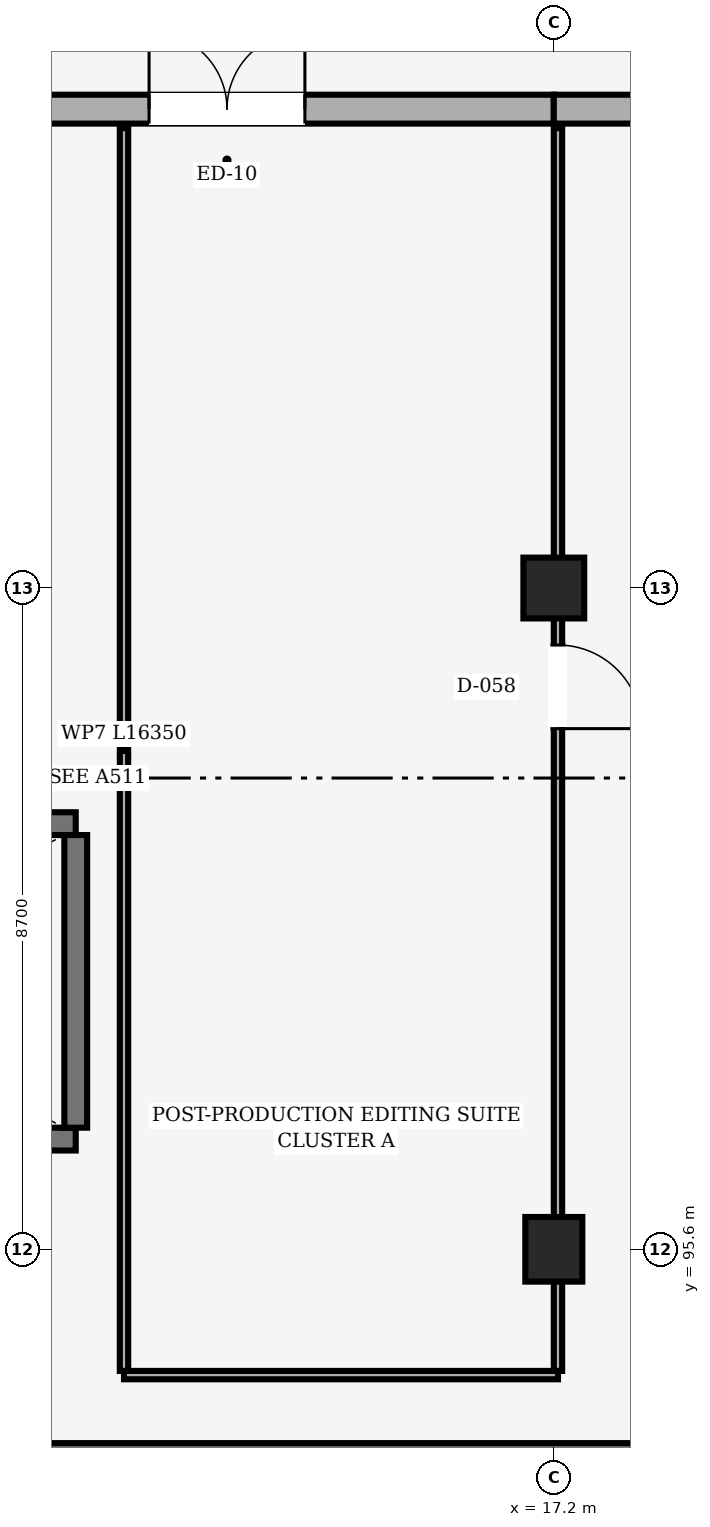
"""IFC4 building model, lengths in metres.
Left out: names, types, materials, properties, quantities, classifications, styles, units other than length and angle.
Written with IfcOpenShell. Run it as: python <this file> out.ifc"""

import sys

from ifc_helpers import new_model, si_unit, direction, frame, frame_2d, origin, origin_2d, place, context, subcontext, project, spatial, rectangle, extrude, element, fill, save


model = new_model("IFC4")
c1 = context("Model", 3, precision=1e-05, world=origin(), true_north=direction((0.0, 1.0)))
c2 = subcontext(c1, "Body", "Model", "MODEL_VIEW")
j1 = project(units=[si_unit("LENGTHUNIT", "METRE"), si_unit("PLANEANGLEUNIT", "RADIAN")], contexts=[c1])
p1 = place(None, origin())
s1 = spatial("IfcSite", under=j1, at=p1, CompositionType="ELEMENT")
p2 = place(p1, origin())
s2 = spatial("IfcBuilding", under=s1, at=p2, CompositionType="ELEMENT")
p3 = place(p2, origin())
s3 = spatial("IfcBuildingStorey", under=s2, at=p3, CompositionType="ELEMENT", Elevation=0.0)
p4 = place(p3, frame((17.2, 95.6, 0.0), z_axis=(0.0, 0.0, 1.0), x_axis=(1.0, 0.0, 0.0)))
e1 = element("IfcColumn", 1, at=p4, inside=s3, PredefinedType="COLUMN", context=c2, shape_type="SweptSolid", body=[
    extrude(rectangle(XDim=0.75, YDim=0.85, at=origin_2d()), origin(), (0.0, 0.0, 1.0), 4.25),
])
p5 = place(p3, frame((17.2, 104.3, 0.0), z_axis=(0.0, 0.0, 1.0), x_axis=(1.0, 0.0, 0.0)))
e2 = element("IfcColumn", 2, at=p5, inside=s3, PredefinedType="COLUMN", context=c2, shape_type="SweptSolid", body=[
    extrude(rectangle(XDim=0.8, YDim=0.8, at=origin_2d()), origin(), (0.0, 0.0, 1.0), 4.25),
])
p6 = place(p3, frame((8.6, 110.6, 0.0), z_axis=(0.0, 0.0, 1.0), x_axis=(1.0, 0.0, 0.0)))
e3 = element("IfcWall", 3, at=p6, inside=s3, PredefinedType="SOLIDWALL", context=c2, shape_type="SweptSolid", body=[
    extrude(rectangle(XDim=8.6, YDim=0.38, at=frame_2d((4.3, 0.0))), origin(), (0.0, 0.0, 1.0), 4.235),
])
p7 = place(p6, frame((3.275, 0.0, 0.0)))
e4 = element("IfcOpeningElement", 4, at=p7, cuts=e3, PredefinedType="OPENING", context=c2, shape_type="SweptSolid", body=[
    extrude(rectangle(XDim=2.05, YDim=2.2, at=frame_2d((1.025, 1.1))), frame((0.0, 0.19, 0.0), z_axis=(0.0, -1.0, 0.0), x_axis=(1.0, 0.0, 0.0)), (0.0, 0.0, 1.0), 0.38),
])
p8 = place(p3, frame((17.2, 110.6, 0.0), z_axis=(0.0, 0.0, 1.0), x_axis=(1.0, 0.0, 0.0)))
e5 = element("IfcWall", 5, at=p8, inside=s3, PredefinedType="SOLIDWALL", context=c2, shape_type="SweptSolid", body=[
    extrude(rectangle(XDim=8.6, YDim=0.38, at=frame_2d((4.3, 0.0))), origin(), (0.0, 0.0, 1.0), 4.235),
])
p9 = place(p3, frame((9.45, 92.9, 0.0), z_axis=(0.0, 0.0, 1.0), x_axis=(1.0, 0.0, 0.0)))
e6 = element("IfcWall", 6, at=p9, inside=s3, PredefinedType="SHEAR", context=c2, shape_type="SweptSolid", body=[
    extrude(rectangle(XDim=10.18, YDim=0.3, at=frame_2d((5.09, 0.0))), origin(), (0.0, 0.0, 1.0), 4.25),
])
p10 = place(p3, frame((10.91, 97.05, 0.0), z_axis=(0.0, 0.0, 1.0), x_axis=(-1.0, 0.0, 0.0)))
e7 = element("IfcWall", 7, at=p10, inside=s3, PredefinedType="SHEAR", context=c2, shape_type="SweptSolid", body=[
    extrude(rectangle(XDim=9.46, YDim=0.3, at=frame_2d((4.73, 0.0))), origin(), (0.0, 0.0, 1.0), 4.25),
])
p11 = place(p10, frame((7.667, 0.0, 0.0)))
e8 = element("IfcOpeningElement", 8, at=p11, cuts=e7, PredefinedType="OPENING", context=c2, shape_type="SweptSolid", body=[
    extrude(rectangle(XDim=1.25, YDim=2.15, at=frame_2d((0.625, 1.075))), frame((0.0, 0.15, 0.0), z_axis=(0.0, -1.0, 0.0), x_axis=(1.0, 0.0, 0.0)), (0.0, 0.0, 1.0), 0.3),
])
p12 = place(p3, frame((1.45, 101.2, 0.0), z_axis=(0.0, 0.0, 1.0), x_axis=(1.0, 0.0, 0.0)))
e9 = element("IfcWall", 9, at=p12, inside=s3, PredefinedType="SHEAR", context=c2, shape_type="SweptSolid", body=[
    extrude(rectangle(XDim=9.46, YDim=0.3, at=frame_2d((4.73, 0.0))), origin(), (0.0, 0.0, 1.0), 4.25),
])
p13 = place(p3, frame((10.91, 101.05, 0.0), z_axis=(0.0, 0.0, 1.0), x_axis=(0.0, -1.0, 0.0)))
e10 = element("IfcWall", 10, at=p13, inside=s3, PredefinedType="SHEAR", context=c2, shape_type="SweptSolid", body=[
    extrude(rectangle(XDim=3.85, YDim=0.3, at=frame_2d((1.925, 0.0))), origin(), (0.0, 0.0, 1.0), 4.25),
])
p14 = place(p3, frame((17.255, 93.945, 0.0), z_axis=(0.0, 0.0, 1.0), x_axis=(-1.0, 0.0, 0.0)))
e11 = element("IfcWall", 11, at=p14, inside=s3, PredefinedType="PARTITIONING", context=c2, shape_type="SweptSolid", body=[
    extrude(rectangle(XDim=5.71, YDim=0.11, at=frame_2d((2.855, 0.0))), origin(), (0.0, 0.0, 1.0), 4.23),
])
p15 = place(p3, frame((11.545, 94.0, 0.0), z_axis=(0.0, 0.0, 1.0), x_axis=(0.0, 1.0, 0.0)))
e12 = element("IfcWall", 12, at=p15, inside=s3, PredefinedType="PARTITIONING", context=c2, shape_type="SweptSolid", body=[
    extrude(rectangle(XDim=16.35, YDim=0.11, at=frame_2d((8.175, 0.0))), origin(), (0.0, 0.0, 1.0), 4.005),
])
p16 = place(p3, frame((17.255, 110.35, 0.0), z_axis=(0.0, 0.0, 1.0), x_axis=(0.0, -1.0, 0.0)))
e13 = element("IfcWall", 13, at=p16, inside=s3, PredefinedType="PARTITIONING", context=c2, shape_type="SweptSolid", body=[
    extrude(rectangle(XDim=16.35, YDim=0.11, at=frame_2d((8.175, 0.0))), origin(), (0.0, 0.0, 1.0), 3.43),
])
p17 = place(p16, frame((6.8, 0.0, 0.0)))
e14 = element("IfcOpeningElement", 14, at=p17, cuts=e13, PredefinedType="OPENING", context=c2, shape_type="SweptSolid", body=[
    extrude(rectangle(XDim=1.1, YDim=2.1, at=frame_2d((0.55, 1.05))), frame((0.0, 0.055, 0.0), z_axis=(0.0, -1.0, 0.0), x_axis=(1.0, 0.0, 0.0)), (0.0, 0.0, 1.0), 0.11),
])
p18 = place(p7, origin())
e15 = element("IfcDoor", 15, at=p18, inside=s3, OperationType="DOUBLE_DOOR_SINGLE_SWING", PredefinedType="DOOR", context=c2, shape_type="SweptSolid", body=[
    extrude(rectangle(XDim=2.05, YDim=2.2, at=frame_2d((1.025, 1.1))), frame((0.0, 0.025, 0.0), z_axis=(0.0, -1.0, 0.0), x_axis=(1.0, 0.0, 0.0)), (0.0, 0.0, 1.0), 0.05),
])
fill(e4, e15)
p19 = place(p17, origin())
e16 = element("IfcDoor", 16, at=p19, inside=s3, OperationType="SINGLE_SWING_RIGHT", PredefinedType="DOOR", context=c2, shape_type="SweptSolid", body=[
    extrude(rectangle(XDim=1.1, YDim=2.1, at=frame_2d((0.55, 1.05))), frame((0.0, 0.025, 0.0), z_axis=(0.0, -1.0, 0.0), x_axis=(1.0, 0.0, 0.0)), (0.0, 0.0, 1.0), 0.05),
])
fill(e14, e16)
save(model, sys.argv[1])
